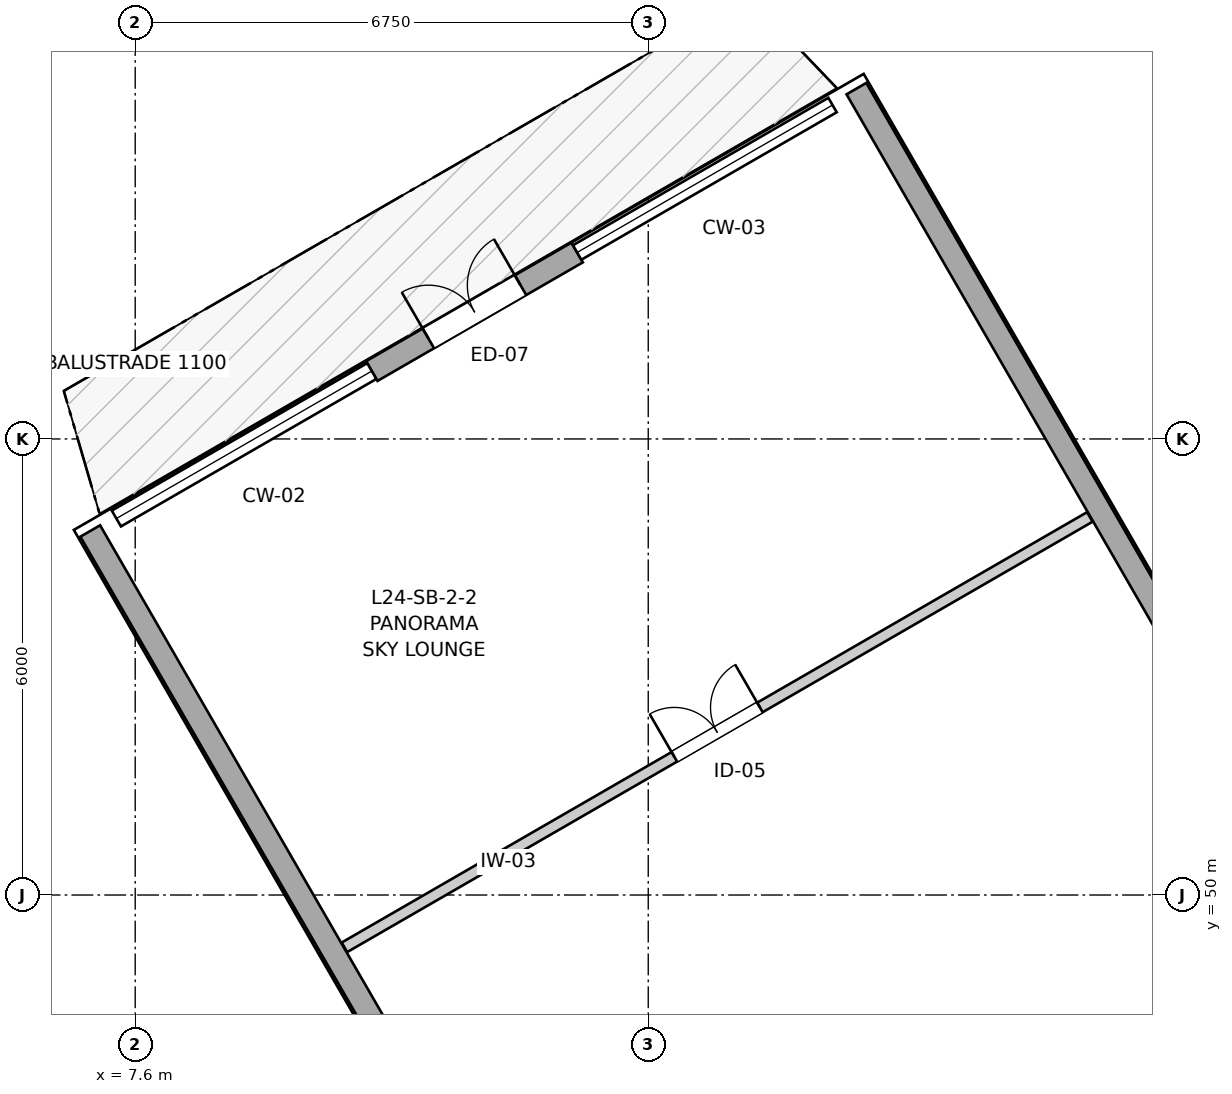
"""IFC4 building model, lengths in metres.
Left out: names, types, materials, properties, quantities, classifications, styles, units other than length and angle.
Written with IfcOpenShell. Run it as: python <this file> out.ifc"""

import sys

from ifc_helpers import new_model, si_unit, direction, frame, frame_2d, origin, place, context, subcontext, project, spatial, rectangle, extrude, source, transform, mapped, element, fill, save


model = new_model("IFC4")
c1 = context("Model", 3, precision=1e-05, world=origin(), true_north=direction((0.0, 1.0)))
c2 = subcontext(c1, "Body", "Model", "MODEL_VIEW")
j1 = project(units=[si_unit("LENGTHUNIT", "METRE"), si_unit("PLANEANGLEUNIT", "RADIAN")], contexts=[c1])
p1 = place(None, origin())
s1 = spatial("IfcSite", under=j1, at=p1, CompositionType="ELEMENT")
p2 = place(p1, origin())
s2 = spatial("IfcBuilding", under=s1, at=p2, CompositionType="ELEMENT")
p3 = place(p2, frame((0.0, 0.0, 83.2)))
s3 = spatial("IfcBuildingStorey", under=s2, at=p3, CompositionType="ELEMENT", Elevation=83.2)
for number, where, z_axis, x_axis in (
    (1, (17.31, 36.946, 0.0), (0.0, 0.0, 1.0), (-0.5, 0.866, 0.0)),
    (2, (27.39, 42.766, 0.0), (0.0, 0.0, 1.0), (-0.5, 0.866, 0.0)),
):
    element("IfcWall", number, at=place(p3, frame(where, z_axis=z_axis, x_axis=x_axis)), inside=s3, PredefinedType="SOLIDWALL", context=c2, shape_type="SweptSolid", body=[
        extrude(rectangle(XDim=20.603, YDim=0.3, at=frame_2d((10.302, 0.0))), origin(), (0.0, 0.0, 1.0), 2.115),
    ])
p4 = place(p3, frame((10.712, 56.893, 0.0), z_axis=(0.0, 0.0, 1.0), x_axis=(0.866029224906, 0.499993381564, 0.0)))
e3 = element("IfcWall", 3, at=p4, inside=s3, PredefinedType="SOLIDWALL", context=c2, shape_type="SweptSolid", body=[
    extrude(rectangle(XDim=3.12, YDim=0.3, at=frame_2d((1.56, 0.0))), origin(), (0.0, 0.0, 1.0), 2.3),
])
p5 = place(p4, frame((0.86, 0.0, 0.0)))
e4 = element("IfcOpeningElement", 4, at=p5, cuts=e3, PredefinedType="OPENING", context=c2, shape_type="SweptSolid", body=[
    extrude(rectangle(XDim=1.4, YDim=2.15, at=frame_2d((0.7, 1.075))), frame((0.0, 0.16, 0.0), z_axis=(0.0, -1.0, 0.0), x_axis=(1.0, 0.0, 0.0)), (0.0, 0.0, 1.0), 0.32),
])
p6 = place(p3, frame((10.353, 49.312, 0.0), z_axis=(0.0, 0.0, 1.0), x_axis=(0.866036235619, 0.499981238243, 0.0)))
e5 = element("IfcWall", 5, at=p6, inside=s3, PredefinedType="PARTITIONING", context=c2, shape_type="SweptSolid", body=[
    extrude(rectangle(XDim=11.324, YDim=0.145, at=frame_2d((5.662, 0.0))), origin(), (0.0, 0.0, 1.0), 2.353),
])
p7 = place(p6, frame((5.012, 0.0, 0.0)))
e6 = element("IfcOpeningElement", 6, at=p7, cuts=e5, PredefinedType="OPENING", context=c2, shape_type="SweptSolid", body=[
    extrude(rectangle(XDim=1.3, YDim=2.1, at=frame_2d((0.65, 1.05))), frame((0.0, 0.083, 0.0), z_axis=(0.0, -1.0, 0.0), x_axis=(1.0, 0.0, 0.0)), (0.0, 0.0, 1.0), 0.165),
])
m1 = source(origin(), c2, "Body", "SweptSolid", [
    extrude(rectangle(XDim=1.4, YDim=2.15, at=frame_2d((0.7, 1.075))), frame((0.0, 0.025, 0.0), z_axis=(0.0, -1.0, 0.0), x_axis=(1.0, 0.0, 0.0)), (0.0, 0.0, 1.0), 0.05),
])
p8 = place(p5, origin())
e7 = element("IfcDoor", 7, at=p8, inside=s3, OperationType="DOUBLE_DOOR_SINGLE_SWING", PredefinedType="DOOR", context=c2, shape_type="MappedRepresentation", body=[
    mapped(m1, transform((0.0, 0.0, 0.0), x_axis=(1.0, 0.0, 0.0), y_axis=(0.0, 1.0, 0.0), z_axis=(0.0, 0.0, 1.0), scale=1.0)),
])
fill(e4, e7)
m2 = source(origin(), c2, "Body", "SweptSolid", [
    extrude(rectangle(XDim=1.3, YDim=2.1, at=frame_2d((0.65, 1.05))), frame((0.0, 0.025, 0.0), z_axis=(0.0, -1.0, 0.0), x_axis=(1.0, 0.0, 0.0)), (0.0, 0.0, 1.0), 0.05),
])
p9 = place(p7, origin())
e8 = element("IfcDoor", 8, at=p9, inside=s3, OperationType="DOUBLE_DOOR_SINGLE_SWING", PredefinedType="DOOR", context=c2, shape_type="MappedRepresentation", body=[
    mapped(m2, transform((0.0, 0.0, 0.0), x_axis=(1.0, 0.0, 0.0), y_axis=(0.0, 1.0, 0.0), z_axis=(0.0, 0.0, 1.0), scale=1.0)),
])
fill(e6, e8)
save(model, sys.argv[1])
